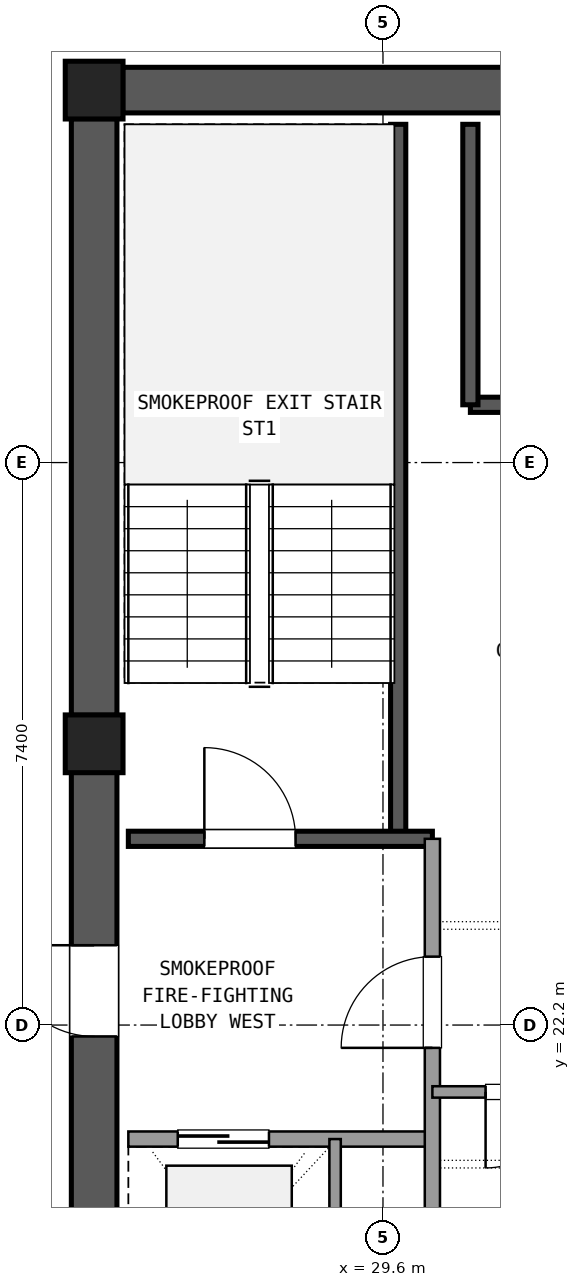
"""IFC4 building model, lengths in metres.
Left out: names, types, materials, properties, quantities, classifications, styles, units other than length and angle.
Written with IfcOpenShell. Run it as: python <this file> out.ifc"""

import sys

from ifc_helpers import new_model, si_unit, direction, frame, frame_2d, origin, origin_2d, place, context, subcontext, project, spatial, rectangle, extrude, element, fill, save


model = new_model("IFC4")
c1 = context("Model", 3, precision=1e-05, world=origin(), true_north=direction((0.0, 1.0)))
c2 = subcontext(c1, "Body", "Model", "MODEL_VIEW")
j1 = project(units=[si_unit("LENGTHUNIT", "METRE"), si_unit("PLANEANGLEUNIT", "RADIAN")], contexts=[c1])
p1 = place(None, origin())
s1 = spatial("IfcSite", under=j1, at=p1, CompositionType="ELEMENT")
p2 = place(p1, origin())
s2 = spatial("IfcBuilding", under=s1, at=p2, CompositionType="ELEMENT")
p3 = place(p2, frame((0.0, 0.0, 257.22)))
s3 = spatial("IfcBuildingStorey", under=s2, at=p3, CompositionType="ELEMENT", Elevation=257.22)
for number, where, z_axis, x_axis in (
    (1, (25.8, 34.5, 0.0), (0.0, 0.0, 1.0), (1.0, 0.0, 0.0)),
    (2, (25.8, 25.9, 0.0), (0.0, 0.0, 1.0), (1.0, 0.0, 0.0)),
):
    element("IfcColumn", number, at=place(p3, frame(where, z_axis=z_axis, x_axis=x_axis)), inside=s3, PredefinedType="COLUMN", context=c2, shape_type="SweptSolid", body=[
        extrude(rectangle(XDim=0.76, YDim=0.76, at=origin_2d()), origin(), (0.0, 0.0, 1.0), 3.6),
    ])
p4 = place(p3, frame((36.625, 34.5, 0.0), z_axis=(0.0, 0.0, 1.0), x_axis=(-1.0, 0.0, 0.0)))
e3 = element("IfcWall", 3, at=p4, inside=s3, PredefinedType="SHEAR", context=c2, shape_type="SweptSolid", body=[
    extrude(rectangle(XDim=10.45, YDim=0.6, at=frame_2d((5.225, 0.0))), origin(), (0.0, 0.0, 1.0), 3.32),
])
p5 = place(p4, frame((4.225, 0.0, 0.0)))
e4 = element("IfcOpeningElement", 4, at=p5, cuts=e3, PredefinedType="OPENING", context=c2, shape_type="SweptSolid", body=[
    extrude(rectangle(XDim=1.2, YDim=2.15, at=frame_2d((0.6, 1.075))), frame((0.0, 0.31, 0.0), z_axis=(0.0, -1.0, 0.0), x_axis=(1.0, 0.0, 0.0)), (0.0, 0.0, 1.0), 0.62),
])
p6 = place(p3, frame((25.8, 34.125, 0.0), z_axis=(0.0, 0.0, 1.0), x_axis=(0.0, -1.0, 0.0)))
e5 = element("IfcWall", 5, at=p6, inside=s3, PredefinedType="SHEAR", context=c2, shape_type="SweptSolid", body=[
    extrude(rectangle(XDim=7.85, YDim=0.6, at=frame_2d((3.925, 0.0))), origin(), (0.0, 0.0, 1.0), 3.32),
])
p7 = place(p3, frame((25.8, 25.525, 0.0), z_axis=(0.0, 0.0, 1.0), x_axis=(0.0, -1.0, 0.0)))
e6 = element("IfcWall", 6, at=p7, inside=s3, PredefinedType="SHEAR", context=c2, shape_type="SweptSolid", body=[
    extrude(rectangle(XDim=7.85, YDim=0.6, at=frame_2d((3.925, 0.0))), origin(), (0.0, 0.0, 1.0), 3.32),
])
p8 = place(p7, frame((2.275, 0.0, 0.0)))
e7 = element("IfcOpeningElement", 7, at=p8, cuts=e6, PredefinedType="OPENING", context=c2, shape_type="SweptSolid", body=[
    extrude(rectangle(XDim=1.2, YDim=2.15, at=frame_2d((0.6, 1.075))), frame((0.0, 0.31, 0.0), z_axis=(0.0, -1.0, 0.0), x_axis=(1.0, 0.0, 0.0)), (0.0, 0.0, 1.0), 0.62),
])
p9 = place(p3, frame((29.8, 24.65, 0.0), z_axis=(0.0, 0.0, 1.0), x_axis=(0.0, 1.0, 0.0)))
e8 = element("IfcWall", 8, at=p9, inside=s3, PredefinedType="SHEAR", context=c2, shape_type="SweptSolid", body=[
    extrude(rectangle(XDim=9.4, YDim=0.2, at=frame_2d((4.7, 0.0))), origin(), (0.0, 0.0, 1.0), 3.32),
])
p10 = place(p3, frame((26.25, 24.65, 0.0), z_axis=(0.0, 0.0, 1.0), x_axis=(1.0, 0.0, 0.0)))
e9 = element("IfcWall", 9, at=p10, inside=s3, PredefinedType="SHEAR", context=c2, shape_type="SweptSolid", body=[
    extrude(rectangle(XDim=4.0, YDim=0.2, at=frame_2d((2.0, 0.0))), origin(), (0.0, 0.0, 1.0), 3.32),
])
p11 = place(p10, frame((1.0, 0.0, 0.0)))
e10 = element("IfcOpeningElement", 10, at=p11, cuts=e9, PredefinedType="OPENING", context=c2, shape_type="SweptSolid", body=[
    extrude(rectangle(XDim=1.2, YDim=2.15, at=frame_2d((0.6, 1.075))), frame((0.0, 0.11, 0.0), z_axis=(0.0, -1.0, 0.0), x_axis=(1.0, 0.0, 0.0)), (0.0, 0.0, 1.0), 0.22),
])
p12 = place(p3, frame((30.75, 30.36, 0.0), z_axis=(0.0, 0.0, 1.0), x_axis=(1.0, 0.0, 0.0)))
e11 = element("IfcWall", 11, at=p12, inside=s3, PredefinedType="SHEAR", context=c2, shape_type="SweptSolid", body=[
    extrude(rectangle(XDim=9.5, YDim=0.2, at=frame_2d((4.75, 0.0))), origin(), (0.0, 0.0, 1.0), 3.32),
])
p13 = place(p3, frame((30.75, 30.36, 0.0), z_axis=(0.0, 0.0, 1.0), x_axis=(0.0, 1.0, 0.0)))
e12 = element("IfcWall", 12, at=p13, inside=s3, PredefinedType="SHEAR", context=c2, shape_type="SweptSolid", body=[
    extrude(rectangle(XDim=3.69, YDim=0.2, at=frame_2d((1.845, 0.0))), origin(), (0.0, 0.0, 1.0), 3.32),
])
p14 = place(p3, frame((26.25, 20.7, 0.0), z_axis=(0.0, 0.0, 1.0), x_axis=(1.0, 0.0, 0.0)))
e13 = element("IfcWall", 13, at=p14, inside=s3, PredefinedType="SOLIDWALL", context=c2, shape_type="SweptSolid", body=[
    extrude(rectangle(XDim=4.0, YDim=0.2, at=frame_2d((2.0, 0.0))), origin(), (0.0, 0.0, 1.0), 2.61),
])
p15 = place(p14, frame((0.65, 0.0, 0.0)))
e14 = element("IfcOpeningElement", 14, at=p15, cuts=e13, PredefinedType="OPENING", context=c2, shape_type="SweptSolid", body=[
    extrude(rectangle(XDim=1.2, YDim=2.15, at=frame_2d((0.6, 1.075))), frame((0.0, 0.11, 0.0), z_axis=(0.0, -1.0, 0.0), x_axis=(1.0, 0.0, 0.0)), (0.0, 0.0, 1.0), 0.22),
])
p16 = place(p3, frame((30.25, 17.75, 0.0), z_axis=(0.0, 0.0, 1.0), x_axis=(0.0, 1.0, 0.0)))
e15 = element("IfcWall", 15, at=p16, inside=s3, PredefinedType="SOLIDWALL", context=c2, shape_type="SweptSolid", body=[
    extrude(rectangle(XDim=6.9, YDim=0.2, at=frame_2d((3.45, 0.0))), origin(), (0.0, 0.0, 1.0), 2.61),
])
p17 = place(p16, frame((4.15, 0.0, 0.0)))
e16 = element("IfcOpeningElement", 16, at=p17, cuts=e15, PredefinedType="OPENING", context=c2, shape_type="SweptSolid", body=[
    extrude(rectangle(XDim=1.2, YDim=2.15, at=frame_2d((0.6, 1.075))), frame((0.0, 0.11, 0.0), z_axis=(0.0, -1.0, 0.0), x_axis=(1.0, 0.0, 0.0)), (0.0, 0.0, 1.0), 0.22),
])
p18 = place(p3, frame((28.97, 17.75, 0.0), z_axis=(0.0, 0.0, 1.0), x_axis=(0.0, 1.0, 0.0)))
e17 = element("IfcWall", 17, at=p18, inside=s3, PredefinedType="PARTITIONING", context=c2, shape_type="SweptSolid", body=[
    extrude(rectangle(XDim=2.95, YDim=0.15, at=frame_2d((1.475, 0.0))), origin(), (0.0, 0.0, 1.0), 2.61),
])
p19 = place(p3, frame((30.25, 21.32, 0.0), z_axis=(0.0, 0.0, 1.0), x_axis=(1.0, 0.0, 0.0)))
e18 = element("IfcWall", 18, at=p19, inside=s3, PredefinedType="PARTITIONING", context=c2, shape_type="SweptSolid", body=[
    extrude(rectangle(XDim=7.0, YDim=0.15, at=frame_2d((3.5, 0.0))), origin(), (0.0, 0.0, 1.0), 2.61),
])
p20 = place(p19, frame((0.7, 0.0, 0.0)))
e19 = element("IfcOpeningElement", 19, at=p20, cuts=e18, PredefinedType="OPENING", context=c2, shape_type="SweptSolid", body=[
    extrude(rectangle(XDim=1.0, YDim=2.15, at=frame_2d((0.5, 1.075))), frame((0.0, 0.085, 0.0), z_axis=(0.0, -1.0, 0.0), x_axis=(1.0, 0.0, 0.0)), (0.0, 0.0, 1.0), 0.17),
])
p21 = place(p19, frame((5.5, 0.0, 0.0)))
e20 = element("IfcOpeningElement", 20, at=p21, cuts=e18, PredefinedType="OPENING", context=c2, shape_type="SweptSolid", body=[
    extrude(rectangle(XDim=1.0, YDim=2.15, at=frame_2d((0.5, 1.075))), frame((0.0, 0.085, 0.0), z_axis=(0.0, -1.0, 0.0), x_axis=(1.0, 0.0, 0.0)), (0.0, 0.0, 1.0), 0.17),
])
p22 = place(p11, origin())
e21 = element("IfcDoor", 21, at=p22, inside=s3, OperationType="SINGLE_SWING_LEFT", PredefinedType="DOOR", context=c2, shape_type="SweptSolid", body=[
    extrude(rectangle(XDim=1.2, YDim=2.15, at=frame_2d((0.6, 1.075))), frame((0.0, 0.025, 0.0), z_axis=(0.0, -1.0, 0.0), x_axis=(1.0, 0.0, 0.0)), (0.0, 0.0, 1.0), 0.05),
])
fill(e10, e21)
p23 = place(p15, origin())
e22 = element("IfcDoor", 22, at=p23, inside=s3, OperationType="SLIDING_TO_LEFT", PredefinedType="DOOR", context=c2, shape_type="SweptSolid", body=[
    extrude(rectangle(XDim=1.2, YDim=2.15, at=frame_2d((0.6, 1.075))), frame((0.0, 0.025, 0.0), z_axis=(0.0, -1.0, 0.0), x_axis=(1.0, 0.0, 0.0)), (0.0, 0.0, 1.0), 0.05),
])
fill(e14, e22)
p24 = place(p17, origin())
e23 = element("IfcDoor", 23, at=p24, inside=s3, OperationType="SINGLE_SWING_LEFT", PredefinedType="DOOR", context=c2, shape_type="SweptSolid", body=[
    extrude(rectangle(XDim=1.2, YDim=2.15, at=frame_2d((0.6, 1.075))), frame((0.0, 0.025, 0.0), z_axis=(0.0, -1.0, 0.0), x_axis=(1.0, 0.0, 0.0)), (0.0, 0.0, 1.0), 0.05),
])
fill(e16, e23)
p25 = place(p8, frame((1.2, 0.0, 0.0), z_axis=(0.0, 0.0, 1.0), x_axis=(-1.0, 0.0, 0.0)))
e24 = element("IfcDoor", 24, at=p25, inside=s3, OperationType="SINGLE_SWING_LEFT", PredefinedType="DOOR", context=c2, shape_type="SweptSolid", body=[
    extrude(rectangle(XDim=1.2, YDim=2.15, at=frame_2d((0.6, 1.075))), frame((0.0, 0.025, 0.0), z_axis=(0.0, -1.0, 0.0), x_axis=(1.0, 0.0, 0.0)), (0.0, 0.0, 1.0), 0.05),
])
fill(e7, e24)
p26 = place(p20, frame((1.0, 0.0, 0.0), z_axis=(0.0, 0.0, 1.0), x_axis=(-1.0, 0.0, 0.0)))
e25 = element("IfcDoor", 25, at=p26, inside=s3, OperationType="SINGLE_SWING_LEFT", PredefinedType="DOOR", context=c2, shape_type="SweptSolid", body=[
    extrude(rectangle(XDim=1.0, YDim=2.15, at=frame_2d((0.5, 1.075))), frame((0.0, 0.025, 0.0), z_axis=(0.0, -1.0, 0.0), x_axis=(1.0, 0.0, 0.0)), (0.0, 0.0, 1.0), 0.05),
])
fill(e19, e25)
save(model, sys.argv[1])
